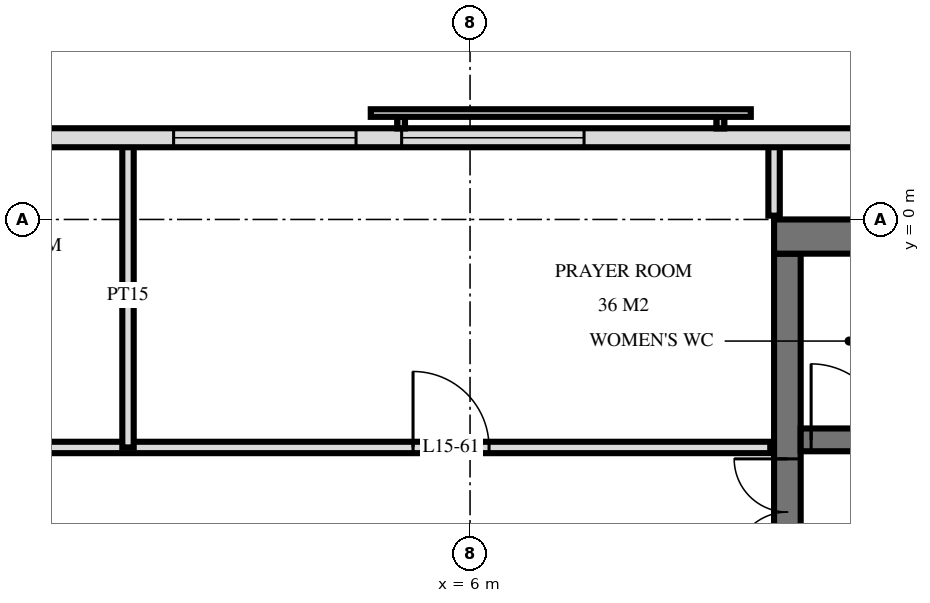
"""IFC4 building model, lengths in metres.
Left out: names, types, materials, properties, quantities, classifications, styles, units other than length and angle.
Written with IfcOpenShell. Run it as: python <this file> out.ifc"""

import sys

from ifc_helpers import new_model, si_unit, direction, frame, frame_2d, origin, place, context, subcontext, project, spatial, rectangle, extrude, element, fill, save


model = new_model("IFC4")
c1 = context("Model", 3, precision=1e-05, world=origin(), true_north=direction((0.0, 1.0)))
c2 = subcontext(c1, "Body", "Model", "MODEL_VIEW")
j1 = project(units=[si_unit("LENGTHUNIT", "METRE"), si_unit("PLANEANGLEUNIT", "RADIAN")], contexts=[c1])
p1 = place(None, origin())
s1 = spatial("IfcSite", under=j1, at=p1, CompositionType="ELEMENT")
p2 = place(p1, origin())
s2 = spatial("IfcBuilding", under=s1, at=p2, CompositionType="ELEMENT")
p3 = place(p2, frame((0.0, 0.0, 63.6)))
s3 = spatial("IfcBuildingStorey", under=s2, at=p3, CompositionType="ELEMENT", Elevation=63.6)
p4 = place(p3, frame((10.0, -0.225, 0.0), z_axis=(0.0, 0.0, 1.0), x_axis=(1.0, 0.0, 0.0)))
e1 = element("IfcWall", 1, at=p4, inside=s3, PredefinedType="SHEAR", context=c2, shape_type="SweptSolid", body=[
    extrude(rectangle(XDim=19.5, YDim=0.45, at=frame_2d((9.75, 0.0))), origin(), (0.0, 0.0, 1.0), 3.6),
])
p5 = place(p3, frame((10.175, -14.55, 0.0), z_axis=(0.0, 0.0, 1.0), x_axis=(0.0, 1.0, 0.0)))
e2 = element("IfcWall", 2, at=p5, inside=s3, PredefinedType="SHEAR", context=c2, shape_type="SweptSolid", body=[
    extrude(rectangle(XDim=14.1, YDim=0.35, at=frame_2d((7.05, 0.0))), origin(), (0.0, 0.0, 1.0), 3.6),
])
p6 = place(p5, frame((8.4, 0.0, 0.0)))
e3 = element("IfcOpeningElement", 3, at=p6, cuts=e2, PredefinedType="OPENING", context=c2, shape_type="SweptSolid", body=[
    extrude(rectangle(XDim=1.4, YDim=2.4, at=frame_2d((0.7, 1.2))), frame((0.0, 0.185, 0.0), z_axis=(0.0, -1.0, 0.0), x_axis=(1.0, 0.0, 0.0)), (0.0, 0.0, 1.0), 0.37),
])
p7 = place(p5, frame((10.0, 0.0, 0.0)))
e4 = element("IfcOpeningElement", 4, at=p7, cuts=e2, PredefinedType="OPENING", context=c2, shape_type="SweptSolid", body=[
    extrude(rectangle(XDim=1.4, YDim=2.4, at=frame_2d((0.7, 1.2))), frame((0.0, 0.185, 0.0), z_axis=(0.0, -1.0, 0.0), x_axis=(1.0, 0.0, 0.0)), (0.0, 0.0, 1.0), 0.37),
])
p8 = place(p5, frame((4.0, 0.0, 0.0)))
e5 = element("IfcOpeningElement", 5, at=p8, cuts=e2, PredefinedType="OPENING", context=c2, shape_type="SweptSolid", body=[
    extrude(rectangle(XDim=1.2, YDim=2.1, at=frame_2d((0.6, 1.05))), frame((0.0, 0.185, 0.0), z_axis=(0.0, -1.0, 0.0), x_axis=(1.0, 0.0, 0.0)), (0.0, 0.0, 1.0), 0.37),
])
p9 = place(p3, frame((10.35, -2.9, 0.0), z_axis=(0.0, 0.0, 1.0), x_axis=(1.0, 0.0, 0.0)))
e6 = element("IfcWall", 6, at=p9, inside=s3, PredefinedType="SHEAR", context=c2, shape_type="SweptSolid", body=[
    extrude(rectangle(XDim=18.7, YDim=0.3, at=frame_2d((9.35, 0.0))), origin(), (0.0, 0.0, 1.0), 3.6),
])
p10 = place(p9, frame((14.65, 0.0, 0.0)))
e7 = element("IfcOpeningElement", 7, at=p10, cuts=e6, PredefinedType="OPENING", context=c2, shape_type="SweptSolid", body=[
    extrude(rectangle(XDim=1.1, YDim=2.1, at=frame_2d((0.55, 1.05))), frame((0.0, 0.16, 0.0), z_axis=(0.0, -1.0, 0.0), x_axis=(1.0, 0.0, 0.0)), (0.0, 0.0, 1.0), 0.32),
])
p11 = place(p9, frame((17.05, 0.0, 0.0)))
e8 = element("IfcOpeningElement", 8, at=p11, cuts=e6, PredefinedType="OPENING", context=c2, shape_type="SweptSolid", body=[
    extrude(rectangle(XDim=1.1, YDim=2.1, at=frame_2d((0.55, 1.05))), frame((0.0, 0.16, 0.0), z_axis=(0.0, -1.0, 0.0), x_axis=(1.0, 0.0, 0.0)), (0.0, 0.0, 1.0), 0.32),
])
p12 = place(p9, frame((6.188, 0.0, 0.0)))
e9 = element("IfcOpeningElement", 9, at=p12, cuts=e6, PredefinedType="OPENING", context=c2, shape_type="SweptSolid", body=[
    extrude(rectangle(XDim=0.9, YDim=2.1, at=frame_2d((0.45, 1.05))), frame((0.0, 0.16, 0.0), z_axis=(0.0, -1.0, 0.0), x_axis=(1.0, 0.0, 0.0)), (0.0, 0.0, 1.0), 0.32),
])
p13 = place(p9, frame((7.613, 0.0, 0.0)))
e10 = element("IfcOpeningElement", 10, at=p13, cuts=e6, PredefinedType="OPENING", context=c2, shape_type="SweptSolid", body=[
    extrude(rectangle(XDim=0.9, YDim=2.1, at=frame_2d((0.45, 1.05))), frame((0.0, 0.16, 0.0), z_axis=(0.0, -1.0, 0.0), x_axis=(1.0, 0.0, 0.0)), (0.0, 0.0, 1.0), 0.32),
])
p14 = place(p9, frame((0.137, 0.0, 0.0)))
e11 = element("IfcOpeningElement", 11, at=p14, cuts=e6, PredefinedType="OPENING", context=c2, shape_type="SweptSolid", body=[
    extrude(rectangle(XDim=1.0, YDim=2.1, at=frame_2d((0.5, 1.05))), frame((0.0, 0.16, 0.0), z_axis=(0.0, -1.0, 0.0), x_axis=(1.0, 0.0, 0.0)), (0.0, 0.0, 1.0), 0.32),
])
p15 = place(p9, frame((1.562, 0.0, 0.0)))
e12 = element("IfcOpeningElement", 12, at=p15, cuts=e6, PredefinedType="OPENING", context=c2, shape_type="SweptSolid", body=[
    extrude(rectangle(XDim=1.0, YDim=2.1, at=frame_2d((0.5, 1.05))), frame((0.0, 0.16, 0.0), z_axis=(0.0, -1.0, 0.0), x_axis=(1.0, 0.0, 0.0)), (0.0, 0.0, 1.0), 0.32),
])
p16 = place(p9, frame((3.85, 0.0, 0.0)))
e13 = element("IfcOpeningElement", 13, at=p16, cuts=e6, PredefinedType="OPENING", context=c2, shape_type="SweptSolid", body=[
    extrude(rectangle(XDim=1.0, YDim=2.1, at=frame_2d((0.5, 1.05))), frame((0.0, 0.16, 0.0), z_axis=(0.0, -1.0, 0.0), x_axis=(1.0, 0.0, 0.0)), (0.0, 0.0, 1.0), 0.32),
])
p17 = place(p9, frame((12.1, 0.0, 0.0)))
e14 = element("IfcOpeningElement", 14, at=p17, cuts=e6, PredefinedType="OPENING", context=c2, shape_type="SweptSolid", body=[
    extrude(rectangle(XDim=1.0, YDim=2.1, at=frame_2d((0.5, 1.05))), frame((0.0, 0.16, 0.0), z_axis=(0.0, -1.0, 0.0), x_axis=(1.0, 0.0, 0.0)), (0.0, 0.0, 1.0), 0.32),
])
p18 = place(p3, frame((28.775, 1.075, 0.0), z_axis=(0.0, 0.0, 1.0), x_axis=(-1.0, 0.0, 0.0)))
e15 = element("IfcWall", 15, at=p18, inside=s3, PredefinedType="SOLIDWALL", context=c2, shape_type="SweptSolid", body=[
    extrude(rectangle(XDim=57.551, YDim=0.25, at=frame_2d((28.775, 0.0))), origin(), (0.0, 0.0, 1.0), 3.32),
])
p19 = place(p18, frame((21.275, 0.0, 0.3)))
e16 = element("IfcOpeningElement", 16, at=p19, cuts=e15, PredefinedType="OPENING", context=c2, shape_type="SweptSolid", body=[
    extrude(rectangle(XDim=2.4, YDim=2.1, at=frame_2d((1.2, 1.05))), frame((0.0, 0.135, 0.0), z_axis=(0.0, -1.0, 0.0), x_axis=(1.0, 0.0, 0.0)), (0.0, 0.0, 1.0), 0.27),
])
p20 = place(p18, frame((24.275, 0.0, 0.3)))
e17 = element("IfcOpeningElement", 17, at=p20, cuts=e15, PredefinedType="OPENING", context=c2, shape_type="SweptSolid", body=[
    extrude(rectangle(XDim=2.4, YDim=2.1, at=frame_2d((1.2, 1.05))), frame((0.0, 0.135, 0.0), z_axis=(0.0, -1.0, 0.0), x_axis=(1.0, 0.0, 0.0)), (0.0, 0.0, 1.0), 0.27),
])
p21 = place(p3, frame((10.0, 0.05, 0.0), z_axis=(0.0, 0.0, 1.0), x_axis=(0.0, 1.0, 0.0)))
e18 = element("IfcWall", 18, at=p21, inside=s3, PredefinedType="PARTITIONING", context=c2, shape_type="SweptSolid", body=[
    extrude(rectangle(XDim=0.97, YDim=0.15, at=frame_2d((0.485, 0.0))), origin(), (0.0, 0.0, 1.0), 3.32),
])
p22 = place(p3, frame((1.5, -3.0, 0.0), z_axis=(0.0, 0.0, 1.0), x_axis=(0.0, 1.0, 0.0)))
e19 = element("IfcWall", 19, at=p22, inside=s3, PredefinedType="PARTITIONING", context=c2, shape_type="SweptSolid", body=[
    extrude(rectangle(XDim=4.02, YDim=0.15, at=frame_2d((2.01, 0.0))), origin(), (0.0, 0.0, 1.0), 3.32),
])
p23 = place(p3, frame((-9.95, -3.0, 0.0), z_axis=(0.0, 0.0, 1.0), x_axis=(1.0, 0.0, 0.0)))
e20 = element("IfcWall", 20, at=p23, inside=s3, PredefinedType="PARTITIONING", context=c2, shape_type="SweptSolid", body=[
    extrude(rectangle(XDim=19.9, YDim=0.15, at=frame_2d((9.95, 0.0))), origin(), (0.0, 0.0, 1.0), 3.32),
])
p24 = place(p23, frame((0.95, 0.0, 0.0)))
e21 = element("IfcOpeningElement", 21, at=p24, cuts=e20, PredefinedType="OPENING", context=c2, shape_type="SweptSolid", body=[
    extrude(rectangle(XDim=1.0, YDim=2.1, at=frame_2d((0.5, 1.05))), frame((0.0, 0.085, 0.0), z_axis=(0.0, -1.0, 0.0), x_axis=(1.0, 0.0, 0.0)), (0.0, 0.0, 1.0), 0.17),
])
p25 = place(p23, frame((3.7, 0.0, 0.0)))
e22 = element("IfcOpeningElement", 22, at=p25, cuts=e20, PredefinedType="OPENING", context=c2, shape_type="SweptSolid", body=[
    extrude(rectangle(XDim=1.0, YDim=2.1, at=frame_2d((0.5, 1.05))), frame((0.0, 0.085, 0.0), z_axis=(0.0, -1.0, 0.0), x_axis=(1.0, 0.0, 0.0)), (0.0, 0.0, 1.0), 0.17),
])
p26 = place(p23, frame((7.95, 0.0, 0.0)))
e23 = element("IfcOpeningElement", 23, at=p26, cuts=e20, PredefinedType="OPENING", context=c2, shape_type="SweptSolid", body=[
    extrude(rectangle(XDim=1.0, YDim=2.1, at=frame_2d((0.5, 1.05))), frame((0.0, 0.085, 0.0), z_axis=(0.0, -1.0, 0.0), x_axis=(1.0, 0.0, 0.0)), (0.0, 0.0, 1.0), 0.17),
])
p27 = place(p23, frame((15.2, 0.0, 0.0)))
e24 = element("IfcOpeningElement", 24, at=p27, cuts=e20, PredefinedType="OPENING", context=c2, shape_type="SweptSolid", body=[
    extrude(rectangle(XDim=1.0, YDim=2.1, at=frame_2d((0.5, 1.05))), frame((0.0, 0.085, 0.0), z_axis=(0.0, -1.0, 0.0), x_axis=(1.0, 0.0, 0.0)), (0.0, 0.0, 1.0), 0.17),
])
p28 = place(p19, origin())
e25 = element("IfcWindow", 25, at=p28, inside=s3, PartitioningType="SINGLE_PANEL", PredefinedType="WINDOW", context=c2, shape_type="SweptSolid", body=[
    extrude(rectangle(XDim=2.4, YDim=2.1, at=frame_2d((1.2, 1.05))), frame((0.0, 0.03, 0.0), z_axis=(0.0, -1.0, 0.0), x_axis=(1.0, 0.0, 0.0)), (0.0, 0.0, 1.0), 0.06),
])
fill(e16, e25)
p29 = place(p20, origin())
e26 = element("IfcWindow", 26, at=p29, inside=s3, PartitioningType="SINGLE_PANEL", PredefinedType="WINDOW", context=c2, shape_type="SweptSolid", body=[
    extrude(rectangle(XDim=2.4, YDim=2.1, at=frame_2d((1.2, 1.05))), frame((0.0, 0.03, 0.0), z_axis=(0.0, -1.0, 0.0), x_axis=(1.0, 0.0, 0.0)), (0.0, 0.0, 1.0), 0.06),
])
fill(e17, e26)
p30 = place(p7, origin())
e27 = element("IfcDoor", 27, at=p30, inside=s3, OperationType="DOUBLE_DOOR_SINGLE_SWING", PredefinedType="DOOR", context=c2, shape_type="SweptSolid", body=[
    extrude(rectangle(XDim=1.4, YDim=2.4, at=frame_2d((0.7, 1.2))), frame((0.0, 0.025, 0.0), z_axis=(0.0, -1.0, 0.0), x_axis=(1.0, 0.0, 0.0)), (0.0, 0.0, 1.0), 0.05),
])
fill(e4, e27)
p31 = place(p14, origin())
e28 = element("IfcDoor", 28, at=p31, inside=s3, OperationType="SINGLE_SWING_RIGHT", PredefinedType="DOOR", context=c2, shape_type="SweptSolid", body=[
    extrude(rectangle(XDim=1.0, YDim=2.1, at=frame_2d((0.5, 1.05))), frame((0.0, 0.025, 0.0), z_axis=(0.0, -1.0, 0.0), x_axis=(1.0, 0.0, 0.0)), (0.0, 0.0, 1.0), 0.05),
])
fill(e11, e28)
p32 = place(p27, origin())
e29 = element("IfcDoor", 29, at=p32, inside=s3, OperationType="SINGLE_SWING_RIGHT", PredefinedType="DOOR", context=c2, shape_type="SweptSolid", body=[
    extrude(rectangle(XDim=1.0, YDim=2.1, at=frame_2d((0.5, 1.05))), frame((0.0, 0.025, 0.0), z_axis=(0.0, -1.0, 0.0), x_axis=(1.0, 0.0, 0.0)), (0.0, 0.0, 1.0), 0.05),
])
fill(e24, e29)
save(model, sys.argv[1])
